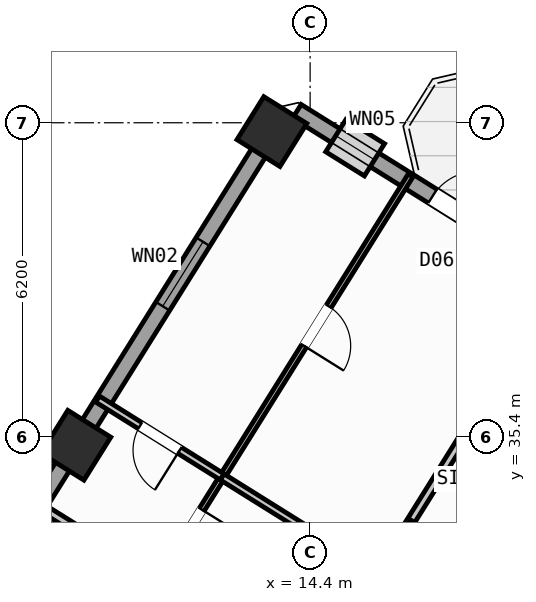
"""IFC4 building model, lengths in metres.
Left out: names, types, materials, properties, quantities, classifications, styles, units other than length and angle.
Written with IfcOpenShell. Run it as: python <this file> out.ifc"""

import sys

from ifc_helpers import new_model, si_unit, direction, frame, frame_2d, origin, origin_2d, place, context, subcontext, project, spatial, rectangle, hollow_rectangle, extrude, source, transform, mapped, element, fill, save


model = new_model("IFC4")
c1 = context("Model", 3, precision=1e-05, world=origin(), true_north=direction((0.0, 1.0)))
c2 = subcontext(c1, "Body", "Model", "MODEL_VIEW")
j1 = project(units=[si_unit("LENGTHUNIT", "METRE"), si_unit("PLANEANGLEUNIT", "RADIAN")], contexts=[c1])
p1 = place(None, origin())
s1 = spatial("IfcSite", under=j1, at=p1, CompositionType="ELEMENT")
p2 = place(p1, origin())
s2 = spatial("IfcBuilding", under=s1, at=p2, CompositionType="ELEMENT")
p3 = place(p2, frame((0.0, 0.0, 52.8)))
s3 = spatial("IfcBuildingStorey", under=s2, at=p3, CompositionType="ELEMENT", Elevation=52.8)
m1 = source(origin(), c2, "Body", "SweptSolid", [
    extrude(hollow_rectangle(XDim=1.0, YDim=1.0, WallThickness=0.04, at=origin_2d()), origin(), (0.0, 0.0, 1.0), 3.6),
])
for number, where, z_axis, x_axis in (
    (1, (13.646, 41.426, 0.0), (0.0, 0.0, 1.0), (-0.848, 0.53, 0.0)),
    (2, (9.777, 35.235, 0.0), (0.0, 0.0, 1.0), (-0.848, 0.53, 0.0)),
):
    element("IfcColumn", number, at=place(p3, frame(where, z_axis=z_axis, x_axis=x_axis)), inside=s3, PredefinedType="COLUMN", context=c2, shape_type="MappedRepresentation", body=[
        mapped(m1, transform((0.0, 0.0, 0.0), scale=1.0)),
    ])
p4 = place(p3, frame((2.415, 23.452, 0.0), z_axis=(0.0, 0.0, 1.0), x_axis=(0.52991049553, 0.848053575387, 0.0)))
e3 = element("IfcWall", 3, at=p4, inside=s3, PredefinedType="STANDARD", context=c2, shape_type="SweptSolid", body=[
    extrude(rectangle(XDim=21.587, YDim=0.32, at=frame_2d((10.794, 0.0))), origin(), (0.0, 0.0, 1.0), 2.725),
])
p5 = place(p4, frame((2.356, 0.0, 0.8)))
e4 = element("IfcOpeningElement", 4, at=p5, cuts=e3, PredefinedType="OPENING", context=c2, shape_type="SweptSolid", body=[
    extrude(rectangle(XDim=2.1, YDim=1.55, at=frame_2d((1.05, 0.775))), frame((0.0, 0.17, 0.0), z_axis=(0.0, -1.0, 0.0), x_axis=(1.0, 0.0, 0.0)), (0.0, 0.0, 1.0), 0.34),
])
p6 = place(p4, frame((8.639, 0.0, 1.0)))
e5 = element("IfcOpeningElement", 5, at=p6, cuts=e3, PredefinedType="OPENING", context=c2, shape_type="SweptSolid", body=[
    extrude(rectangle(XDim=0.9, YDim=1.25, at=frame_2d((0.45, 0.625))), frame((0.0, 0.17, 0.0), z_axis=(0.0, -1.0, 0.0), x_axis=(1.0, 0.0, 0.0)), (0.0, 0.0, 1.0), 0.34),
])
p7 = place(p4, frame((17.129, 0.0, 0.85)))
e6 = element("IfcOpeningElement", 6, at=p7, cuts=e3, PredefinedType="OPENING", context=c2, shape_type="SweptSolid", body=[
    extrude(rectangle(XDim=1.5, YDim=1.5, at=frame_2d((0.75, 0.75))), frame((0.0, 0.17, 0.0), z_axis=(0.0, -1.0, 0.0), x_axis=(1.0, 0.0, 0.0)), (0.0, 0.0, 1.0), 0.34),
])
p8 = place(p3, frame((14.138, 41.825, 0.0), z_axis=(0.0, 0.0, 1.0), x_axis=(0.848046498049, -0.529921821731, 0.0)))
e7 = element("IfcWall", 7, at=p8, inside=s3, PredefinedType="STANDARD", context=c2, shape_type="SweptSolid", body=[
    extrude(rectangle(XDim=31.588, YDim=0.32, at=frame_2d((15.794, 0.0))), origin(), (0.0, 0.0, 1.0), 3.35),
])
p9 = place(p8, frame((3.159, 0.0, 0.0)))
e8 = element("IfcOpeningElement", 8, at=p9, cuts=e7, PredefinedType="OPENING", context=c2, shape_type="SweptSolid", body=[
    extrude(rectangle(XDim=1.05, YDim=2.15, at=frame_2d((0.525, 1.075))), frame((0.0, 0.17, 0.0), z_axis=(0.0, -1.0, 0.0), x_axis=(1.0, 0.0, 0.0)), (0.0, 0.0, 1.0), 0.34),
])
p10 = place(p8, frame((0.906, 0.0, 1.0)))
e9 = element("IfcOpeningElement", 9, at=p10, cuts=e7, PredefinedType="OPENING", context=c2, shape_type="SweptSolid", body=[
    extrude(rectangle(XDim=0.9, YDim=1.25, at=frame_2d((0.45, 0.625))), frame((0.0, 0.17, 0.0), z_axis=(0.0, -1.0, 0.0), x_axis=(1.0, 0.0, 0.0)), (0.0, 0.0, 1.0), 0.34),
])
p11 = place(p8, frame((9.537, 0.0, 0.85)))
e10 = element("IfcOpeningElement", 10, at=p11, cuts=e7, PredefinedType="OPENING", context=c2, shape_type="SweptSolid", body=[
    extrude(rectangle(XDim=1.8, YDim=1.5, at=frame_2d((0.9, 0.75))), frame((0.0, 0.17, 0.0), z_axis=(0.0, -1.0, 0.0), x_axis=(1.0, 0.0, 0.0)), (0.0, 0.0, 1.0), 0.34),
])
p12 = place(p8, frame((13.899, 0.0, 0.85)))
e11 = element("IfcOpeningElement", 11, at=p12, cuts=e7, PredefinedType="OPENING", context=c2, shape_type="SweptSolid", body=[
    extrude(rectangle(XDim=1.5, YDim=1.5, at=frame_2d((0.75, 0.75))), frame((0.0, 0.17, 0.0), z_axis=(0.0, -1.0, 0.0), x_axis=(1.0, 0.0, 0.0)), (0.0, 0.0, 1.0), 0.34),
])
p13 = place(p8, frame((22.019, 0.0, 0.95)))
e12 = element("IfcOpeningElement", 12, at=p13, cuts=e7, PredefinedType="OPENING", context=c2, shape_type="SweptSolid", body=[
    extrude(rectangle(XDim=1.2, YDim=1.4, at=frame_2d((0.6, 0.7))), frame((0.0, 0.17, 0.0), z_axis=(0.0, -1.0, 0.0), x_axis=(1.0, 0.0, 0.0)), (0.0, 0.0, 1.0), 0.34),
])
p14 = place(p8, frame((27.569, 0.0, 0.95)))
e13 = element("IfcOpeningElement", 13, at=p14, cuts=e7, PredefinedType="OPENING", context=c2, shape_type="SweptSolid", body=[
    extrude(rectangle(XDim=1.2, YDim=1.4, at=frame_2d((0.6, 0.7))), frame((0.0, 0.17, 0.0), z_axis=(0.0, -1.0, 0.0), x_axis=(1.0, 0.0, 0.0)), (0.0, 0.0, 1.0), 0.34),
])
p15 = place(p3, frame((23.104, 25.256, 0.0), z_axis=(0.0, 0.0, 1.0), x_axis=(-0.848041752158, 0.529929416617, 0.0)))
e14 = element("IfcWall", 14, at=p15, inside=s3, PredefinedType="PARTITIONING", context=c2, shape_type="SweptSolid", body=[
    extrude(rectangle(XDim=16.73, YDim=0.16, at=frame_2d((8.365, 0.0))), origin(), (0.0, 0.0, 1.0), 3.34),
])
p16 = place(p15, frame((1.395, 0.0, 0.0)))
e15 = element("IfcOpeningElement", 15, at=p16, cuts=e14, PredefinedType="OPENING", context=c2, shape_type="SweptSolid", body=[
    extrude(rectangle(XDim=1.0, YDim=2.1, at=frame_2d((0.5, 1.05))), frame((0.0, 0.09, 0.0), z_axis=(0.0, -1.0, 0.0), x_axis=(1.0, 0.0, 0.0)), (0.0, 0.0, 1.0), 0.18),
])
p17 = place(p15, frame((7.82, 0.0, 0.0)))
e16 = element("IfcOpeningElement", 16, at=p17, cuts=e14, PredefinedType="OPENING", context=c2, shape_type="SweptSolid", body=[
    extrude(rectangle(XDim=1.0, YDim=2.1, at=frame_2d((0.5, 1.05))), frame((0.0, 0.09, 0.0), z_axis=(0.0, -1.0, 0.0), x_axis=(1.0, 0.0, 0.0)), (0.0, 0.0, 1.0), 0.18),
])
p18 = place(p15, frame((14.76, 0.0, 0.0)))
e17 = element("IfcOpeningElement", 17, at=p18, cuts=e14, PredefinedType="OPENING", context=c2, shape_type="SweptSolid", body=[
    extrude(rectangle(XDim=1.0, YDim=2.1, at=frame_2d((0.5, 1.05))), frame((0.0, 0.09, 0.0), z_axis=(0.0, -1.0, 0.0), x_axis=(1.0, 0.0, 0.0)), (0.0, 0.0, 1.0), 0.18),
])
p19 = place(p3, frame((18.802, 37.6, 0.0), z_axis=(0.0, 0.0, 1.0), x_axis=(-0.529915015264, -0.848050751193, 0.0)))
e18 = element("IfcWall", 18, at=p19, inside=s3, PredefinedType="PARTITIONING", context=c2, shape_type="SweptSolid", body=[
    extrude(rectangle(XDim=6.276, YDim=0.16, at=frame_2d((3.138, 0.0))), origin(), (0.0, 0.0, 1.0), 2.725),
])
p20 = place(p3, frame((21.787, 30.301, 0.0), z_axis=(0.0, 0.0, 1.0), x_axis=(-0.848049732085, 0.529916646191, 0.0)))
e19 = element("IfcWall", 19, at=p20, inside=s3, PredefinedType="PLUMBINGWALL", context=c2, shape_type="SweptSolid", body=[
    extrude(rectangle(XDim=6.4, YDim=0.14, at=frame_2d((3.2, 0.0))), origin(), (0.0, 0.0, 1.0), 3.34),
])
p21 = place(p20, frame((2.824, 0.0, 0.0)))
e20 = element("IfcOpeningElement", 20, at=p21, cuts=e19, PredefinedType="OPENING", context=c2, shape_type="SweptSolid", body=[
    extrude(rectangle(XDim=0.78, YDim=2.05, at=frame_2d((0.39, 1.025))), frame((0.0, 0.08, 0.0), z_axis=(0.0, -1.0, 0.0), x_axis=(1.0, 0.0, 0.0)), (0.0, 0.0, 1.0), 0.16),
])
p22 = place(p3, frame((16.385, 40.563, 0.0), z_axis=(0.0, 0.0, 1.0), x_axis=(-0.529931378574, -0.848040526156, 0.0)))
e21 = element("IfcWall", 21, at=p22, inside=s3, PredefinedType="PARTITIONING", context=c2, shape_type="SweptSolid", body=[
    extrude(rectangle(XDim=9.42, YDim=0.11, at=frame_2d((4.71, 0.0))), origin(), (0.0, 0.0, 1.0), 3.34),
])
p23 = place(p22, frame((7.78, 0.0, 0.0)))
e22 = element("IfcOpeningElement", 22, at=p23, cuts=e21, PredefinedType="OPENING", context=c2, shape_type="SweptSolid", body=[
    extrude(rectangle(XDim=0.78, YDim=2.05, at=frame_2d((0.39, 1.025))), frame((0.0, 0.065, 0.0), z_axis=(0.0, -1.0, 0.0), x_axis=(1.0, 0.0, 0.0)), (0.0, 0.0, 1.0), 0.13),
])
p24 = place(p22, frame((3.05, 0.0, 0.0)))
e23 = element("IfcOpeningElement", 23, at=p24, cuts=e21, PredefinedType="OPENING", context=c2, shape_type="SweptSolid", body=[
    extrude(rectangle(XDim=0.92, YDim=2.08, at=frame_2d((0.46, 1.04))), frame((0.0, 0.065, 0.0), z_axis=(0.0, -1.0, 0.0), x_axis=(1.0, 0.0, 0.0)), (0.0, 0.0, 1.0), 0.13),
])
p25 = place(p3, frame((12.665, 34.61, 0.0), z_axis=(0.0, 0.0, 1.0), x_axis=(-0.848045593671, 0.529923269025, 0.0)))
e24 = element("IfcWall", 24, at=p25, inside=s3, PredefinedType="PLUMBINGWALL", context=c2, shape_type="SweptSolid", body=[
    extrude(rectangle(XDim=2.9, YDim=0.14, at=frame_2d((1.45, 0.0))), origin(), (0.0, 0.0, 1.0), 3.34),
])
p26 = place(p25, frame((0.99, 0.0, 0.0)))
e25 = element("IfcOpeningElement", 25, at=p26, cuts=e24, PredefinedType="OPENING", context=c2, shape_type="SweptSolid", body=[
    extrude(rectangle(XDim=0.92, YDim=2.08, at=frame_2d((0.46, 1.04))), frame((0.0, 0.08, 0.0), z_axis=(0.0, -1.0, 0.0), x_axis=(1.0, 0.0, 0.0)), (0.0, 0.0, 1.0), 0.16),
])
p27 = place(p3, frame((15.734, 32.692, 0.0), z_axis=(0.0, 0.0, 1.0), x_axis=(-0.848051346257, 0.52991406295, 0.0)))
e26 = element("IfcWall", 26, at=p27, inside=s3, PredefinedType="PLUMBINGWALL", context=c2, shape_type="SweptSolid", body=[
    extrude(rectangle(XDim=3.62, YDim=0.14, at=frame_2d((1.81, 0.0))), origin(), (0.0, 0.0, 1.0), 3.34),
])
m2 = source(origin(), c2, "Body", "SweptSolid", [
    extrude(rectangle(XDim=1.05, YDim=2.15, at=frame_2d((0.525, 1.075))), frame((0.0, 0.025, 0.0), z_axis=(0.0, -1.0, 0.0), x_axis=(1.0, 0.0, 0.0)), (0.0, 0.0, 1.0), 0.05),
])
p28 = place(p9, origin())
e27 = element("IfcDoor", 27, at=p28, inside=s3, OperationType="SINGLE_SWING_RIGHT", PredefinedType="DOOR", context=c2, shape_type="MappedRepresentation", body=[
    mapped(m2, transform((0.0, 0.0, 0.0), scale=1.0)),
])
fill(e8, e27)
m3 = source(origin(), c2, "Body", "SweptSolid", [
    extrude(rectangle(XDim=1.5, YDim=1.5, at=frame_2d((0.75, 0.75))), frame((0.0, 0.03, 0.0), z_axis=(0.0, -1.0, 0.0), x_axis=(1.0, 0.0, 0.0)), (0.0, 0.0, 1.0), 0.06),
])
p29 = place(p7, origin())
e28 = element("IfcWindow", 28, at=p29, inside=s3, PartitioningType="SINGLE_PANEL", PredefinedType="WINDOW", context=c2, shape_type="MappedRepresentation", body=[
    mapped(m3, transform((0.0, 0.0, 0.0), scale=1.0)),
])
fill(e6, e28)
m4 = source(origin(), c2, "Body", "SweptSolid", [
    extrude(rectangle(XDim=0.9, YDim=1.25, at=frame_2d((0.45, 0.625))), frame((0.0, 0.03, 0.0), z_axis=(0.0, -1.0, 0.0), x_axis=(1.0, 0.0, 0.0)), (0.0, 0.0, 1.0), 0.06),
])
p30 = place(p10, origin())
e29 = element("IfcWindow", 29, at=p30, inside=s3, PartitioningType="SINGLE_PANEL", PredefinedType="WINDOW", context=c2, shape_type="MappedRepresentation", body=[
    mapped(m4, transform((0.0, 0.0, 0.0), scale=1.0)),
])
fill(e9, e29)
m5 = source(origin(), c2, "Body", "SweptSolid", [
    extrude(rectangle(XDim=0.92, YDim=2.08, at=frame_2d((0.46, 1.04))), frame((0.0, 0.025, 0.0), z_axis=(0.0, -1.0, 0.0), x_axis=(1.0, 0.0, 0.0)), (0.0, 0.0, 1.0), 0.05),
])
p31 = place(p26, origin())
e30 = element("IfcDoor", 30, at=p31, inside=s3, OperationType="SINGLE_SWING_LEFT", PredefinedType="DOOR", context=c2, shape_type="MappedRepresentation", body=[
    mapped(m5, transform((0.0, 0.0, 0.0), scale=1.0)),
])
fill(e25, e30)
m6 = source(origin(), c2, "Body", "SweptSolid", [
    extrude(rectangle(XDim=0.78, YDim=2.05, at=frame_2d((0.39, 1.025))), frame((0.0, 0.025, 0.0), z_axis=(0.0, -1.0, 0.0), x_axis=(1.0, 0.0, 0.0)), (0.0, 0.0, 1.0), 0.05),
])
p32 = place(p23, origin())
e31 = element("IfcDoor", 31, at=p32, inside=s3, OperationType="SINGLE_SWING_LEFT", PredefinedType="DOOR", context=c2, shape_type="MappedRepresentation", body=[
    mapped(m6, transform((0.0, 0.0, 0.0), scale=1.0)),
])
fill(e22, e31)
p33 = place(p24, origin())
e32 = element("IfcDoor", 32, at=p33, inside=s3, OperationType="SINGLE_SWING_RIGHT", PredefinedType="DOOR", context=c2, shape_type="MappedRepresentation", body=[
    mapped(m5, transform((0.0, 0.0, 0.0), scale=1.0)),
])
fill(e23, e32)
save(model, sys.argv[1])
